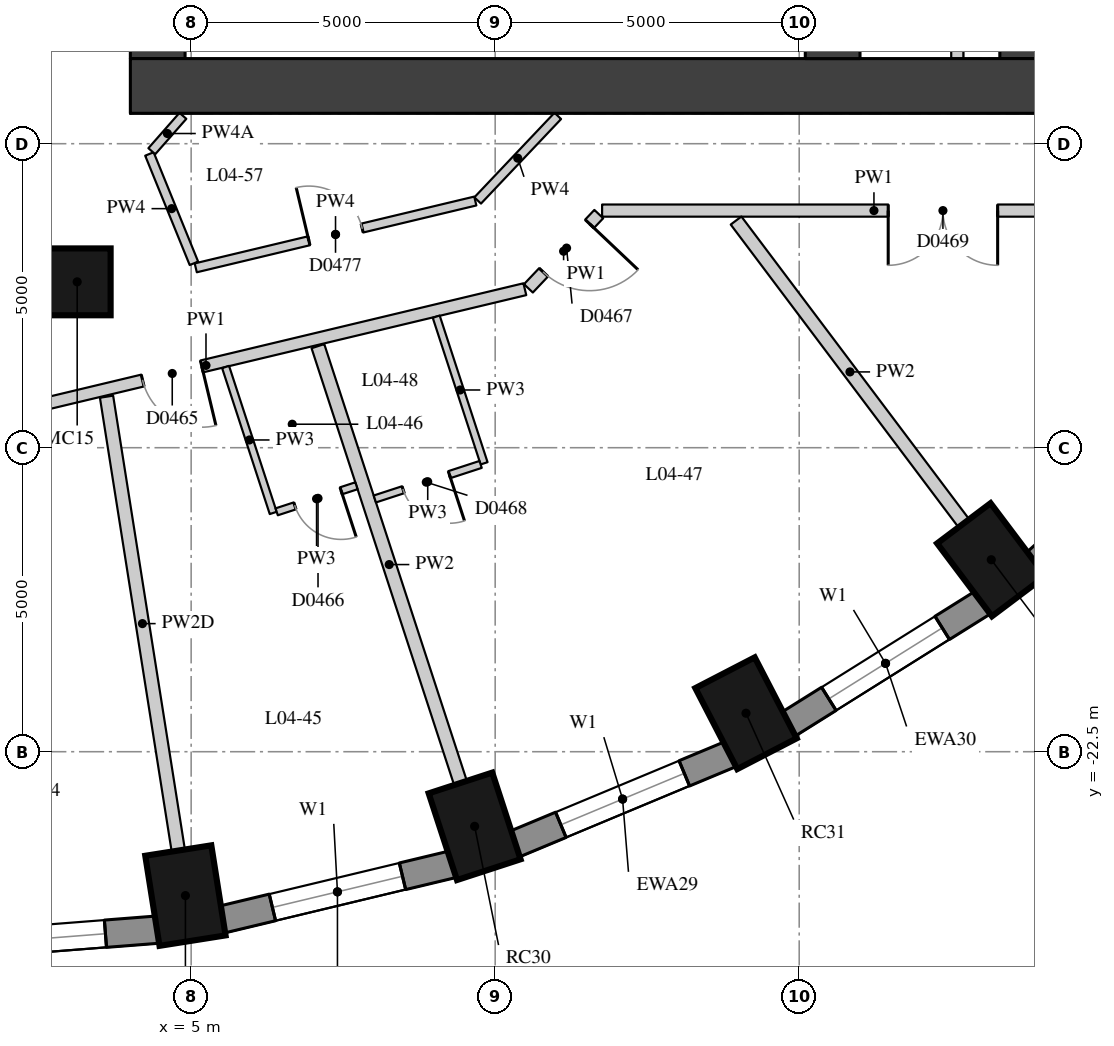
"""IFC4 building model, lengths in metres.
Left out: names, types, materials, properties, quantities, classifications, styles, units other than length and angle.
Written with IfcOpenShell. Run it as: python <this file> out.ifc"""

import sys

from ifc_helpers import new_model, si_unit, direction, frame, frame_2d, origin, origin_2d, place, context, subcontext, project, spatial, rectangle, extrude, element, fill, save


model = new_model("IFC4")
c1 = context("Model", 3, precision=1e-05, world=origin(), true_north=direction((0.0, 1.0)))
c2 = subcontext(c1, "Body", "Model", "MODEL_VIEW")
j1 = project(units=[si_unit("LENGTHUNIT", "METRE"), si_unit("PLANEANGLEUNIT", "RADIAN")], contexts=[c1])
p1 = place(None, origin())
s1 = spatial("IfcSite", under=j1, at=p1, CompositionType="ELEMENT")
p2 = place(p1, origin())
s2 = spatial("IfcBuilding", under=s1, at=p2, CompositionType="ELEMENT")
p3 = place(p2, frame((0.0, 0.0, 21.7)))
s3 = spatial("IfcBuildingStorey", under=s2, at=p3, CompositionType="ELEMENT", Elevation=21.7)
for number, where, z_axis, x_axis in (
    (1, (4.906, -24.866, 0.0), (0.0, 0.0, 1.0), (0.156, -0.988, 0.0)),
    (2, (9.662, -23.727, 0.0), (0.0, 0.0, 1.0), (0.31, -0.951, 0.0)),
    (3, (14.125, -21.867, 0.0), (0.0, 0.0, 1.0), (0.46, -0.888, 0.0)),
    (4, (18.159, -19.343, 0.0), (0.0, 0.0, 1.0), (0.601, -0.799, 0.0)),
):
    element("IfcColumn", number, at=place(p3, frame(where, z_axis=z_axis, x_axis=x_axis)), inside=s3, PredefinedType="COLUMN", context=c2, shape_type="SweptSolid", body=[
        extrude(rectangle(XDim=1.5, YDim=1.1, at=origin_2d()), origin(), (0.0, 0.0, 1.0), 3.3),
    ])
p4 = place(p3, frame((3.126, -14.772, 0.0), z_axis=(0.0, 0.0, 1.0), x_axis=(1.0, 0.0, 0.0)))
e5 = element("IfcColumn", 5, at=p4, inside=s3, PredefinedType="COLUMN", context=c2, shape_type="SweptSolid", body=[
    extrude(rectangle(XDim=1.1, YDim=1.1, at=origin_2d()), origin(), (0.0, 0.0, 1.0), 3.3),
])
p5 = place(p3, frame((0.53, -25.733, 0.0), z_axis=(0.0, 0.0, 1.0), x_axis=(0.996955972145, 0.077966592873, 0.0)))
e6 = element("IfcWall", 6, at=p5, inside=s3, PredefinedType="SOLIDWALL", context=c2, shape_type="SweptSolid", body=[
    extrude(rectangle(XDim=3.939, YDim=0.45, at=frame_2d((1.97, 0.0))), origin(), (0.0, 0.0, 1.0), 3.02),
])
p6 = place(p5, frame((0.87, 0.0, 0.4)))
e7 = element("IfcOpeningElement", 7, at=p6, cuts=e6, PredefinedType="OPENING", context=c2, shape_type="SweptSolid", body=[
    extrude(rectangle(XDim=2.2, YDim=1.75, at=frame_2d((1.1, 0.875))), frame((0.0, 0.235, 0.0), z_axis=(0.0, -1.0, 0.0), x_axis=(1.0, 0.0, 0.0)), (0.0, 0.0, 1.0), 0.47),
])
p7 = place(p3, frame((5.504, -25.26, 0.0), z_axis=(0.0, 0.0, 1.0), x_axis=(0.972496561493, 0.232917233979, 0.0)))
e8 = element("IfcWall", 8, at=p7, inside=s3, PredefinedType="SOLIDWALL", context=c2, shape_type="SweptSolid", body=[
    extrude(rectangle(XDim=3.911, YDim=0.45, at=frame_2d((1.956, 0.0))), origin(), (0.0, 0.0, 1.0), 3.02),
])
p8 = place(p7, frame((0.855, 0.0, 0.4)))
e9 = element("IfcOpeningElement", 9, at=p8, cuts=e8, PredefinedType="OPENING", context=c2, shape_type="SweptSolid", body=[
    extrude(rectangle(XDim=2.2, YDim=1.75, at=frame_2d((1.1, 0.875))), frame((0.0, 0.235, 0.0), z_axis=(0.0, -1.0, 0.0), x_axis=(1.0, 0.0, 0.0)), (0.0, 0.0, 1.0), 0.47),
])
p9 = place(p3, frame((10.315, -24.021, 0.0), z_axis=(0.0, 0.0, 1.0), x_axis=(0.923031964282, 0.384723267966, 0.0)))
e10 = element("IfcWall", 10, at=p9, inside=s3, PredefinedType="SOLIDWALL", context=c2, shape_type="SweptSolid", body=[
    extrude(rectangle(XDim=3.856, YDim=0.45, at=frame_2d((1.928, 0.0))), origin(), (0.0, 0.0, 1.0), 3.02),
])
p10 = place(p9, frame((0.828, 0.0, 0.4)))
e11 = element("IfcOpeningElement", 11, at=p10, cuts=e10, PredefinedType="OPENING", context=c2, shape_type="SweptSolid", body=[
    extrude(rectangle(XDim=2.2, YDim=1.75, at=frame_2d((1.1, 0.875))), frame((0.0, 0.235, 0.0), z_axis=(0.0, -1.0, 0.0), x_axis=(1.0, 0.0, 0.0)), (0.0, 0.0, 1.0), 0.47),
])
p11 = place(p3, frame((14.817, -22.051, 0.0), z_axis=(0.0, 0.0, 1.0), x_axis=(0.847635480093, 0.530579016629, 0.0)))
e12 = element("IfcWall", 12, at=p11, inside=s3, PredefinedType="SOLIDWALL", context=c2, shape_type="SweptSolid", body=[
    extrude(rectangle(XDim=3.782, YDim=0.45, at=frame_2d((1.891, 0.0))), origin(), (0.0, 0.0, 1.0), 3.02),
])
p12 = place(p11, frame((0.791, 0.0, 0.4)))
e13 = element("IfcOpeningElement", 13, at=p12, cuts=e12, PredefinedType="OPENING", context=c2, shape_type="SweptSolid", body=[
    extrude(rectangle(XDim=2.2, YDim=1.75, at=frame_2d((1.1, 0.875))), frame((0.0, 0.235, 0.0), z_axis=(0.0, -1.0, 0.0), x_axis=(1.0, 0.0, 0.0)), (0.0, 0.0, 1.0), 0.47),
])
p13 = place(p3, frame((18.871, -19.407, 0.0), z_axis=(0.0, 0.0, 1.0), x_axis=(0.745526233716, 0.66647628228, 0.0)))
e14 = element("IfcWall", 14, at=p13, inside=s3, PredefinedType="SOLIDWALL", context=c2, shape_type="SweptSolid", body=[
    extrude(rectangle(XDim=3.697, YDim=0.45, at=frame_2d((1.848, 0.0))), origin(), (0.0, 0.0, 1.0), 3.02),
])
p14 = place(p3, frame((4.45, -11.1, 0.0), z_axis=(0.0, 0.0, 1.0), x_axis=(0.0, 1.0, 0.0)))
e15 = element("IfcWall", 15, at=p14, inside=s3, PredefinedType="SHEAR", context=c2, shape_type="SweptSolid", body=[
    extrude(rectangle(XDim=22.2, YDim=0.9, at=frame_2d((11.1, 0.0))), origin(), (0.0, 0.0, 1.0), 3.02),
])
p15 = place(p14, frame((2.35, 0.0, 0.0)))
e16 = element("IfcOpeningElement", 16, at=p15, cuts=e15, PredefinedType="OPENING", context=c2, shape_type="SweptSolid", body=[
    extrude(rectangle(XDim=1.5, YDim=2.1, at=frame_2d((0.75, 1.05))), frame((0.0, 0.46, 0.0), z_axis=(0.0, -1.0, 0.0), x_axis=(1.0, 0.0, 0.0)), (0.0, 0.0, 1.0), 0.92),
])
p16 = place(p14, frame((5.45, 0.0, 0.0)))
e17 = element("IfcOpeningElement", 17, at=p16, cuts=e15, PredefinedType="OPENING", context=c2, shape_type="SweptSolid", body=[
    extrude(rectangle(XDim=1.8, YDim=2.1, at=frame_2d((0.9, 1.05))), frame((0.0, 0.46, 0.0), z_axis=(0.0, -1.0, 0.0), x_axis=(1.0, 0.0, 0.0)), (0.0, 0.0, 1.0), 0.92),
])
p17 = place(p14, frame((7.95, 0.0, 0.0)))
e18 = element("IfcOpeningElement", 18, at=p17, cuts=e15, PredefinedType="OPENING", context=c2, shape_type="SweptSolid", body=[
    extrude(rectangle(XDim=1.1, YDim=2.1, at=frame_2d((0.55, 1.05))), frame((0.0, 0.46, 0.0), z_axis=(0.0, -1.0, 0.0), x_axis=(1.0, 0.0, 0.0)), (0.0, 0.0, 1.0), 0.92),
])
p18 = place(p14, frame((10.6, 0.0, 0.0)))
e19 = element("IfcOpeningElement", 19, at=p18, cuts=e15, PredefinedType="OPENING", context=c2, shape_type="SweptSolid", body=[
    extrude(rectangle(XDim=1.0, YDim=2.1, at=frame_2d((0.5, 1.05))), frame((0.0, 0.46, 0.0), z_axis=(0.0, -1.0, 0.0), x_axis=(1.0, 0.0, 0.0)), (0.0, 0.0, 1.0), 0.92),
])
p19 = place(p14, frame((13.15, 0.0, 0.0)))
e20 = element("IfcOpeningElement", 20, at=p19, cuts=e15, PredefinedType="OPENING", context=c2, shape_type="SweptSolid", body=[
    extrude(rectangle(XDim=1.1, YDim=2.1, at=frame_2d((0.55, 1.05))), frame((0.0, 0.46, 0.0), z_axis=(0.0, -1.0, 0.0), x_axis=(1.0, 0.0, 0.0)), (0.0, 0.0, 1.0), 0.92),
])
p20 = place(p14, frame((14.95, 0.0, 0.0)))
e21 = element("IfcOpeningElement", 21, at=p20, cuts=e15, PredefinedType="OPENING", context=c2, shape_type="SweptSolid", body=[
    extrude(rectangle(XDim=1.8, YDim=2.1, at=frame_2d((0.9, 1.05))), frame((0.0, 0.46, 0.0), z_axis=(0.0, -1.0, 0.0), x_axis=(1.0, 0.0, 0.0)), (0.0, 0.0, 1.0), 0.92),
])
p21 = place(p14, frame((18.35, 0.0, 0.0)))
e22 = element("IfcOpeningElement", 22, at=p21, cuts=e15, PredefinedType="OPENING", context=c2, shape_type="SweptSolid", body=[
    extrude(rectangle(XDim=1.5, YDim=2.1, at=frame_2d((0.75, 1.05))), frame((0.0, 0.46, 0.0), z_axis=(0.0, -1.0, 0.0), x_axis=(1.0, 0.0, 0.0)), (0.0, 0.0, 1.0), 0.92),
])
p22 = place(p3, frame((18.75, -11.1, 0.0), z_axis=(0.0, 0.0, 1.0), x_axis=(0.0, 1.0, 0.0)))
e23 = element("IfcWall", 23, at=p22, inside=s3, PredefinedType="SHEAR", context=c2, shape_type="SweptSolid", body=[
    extrude(rectangle(XDim=22.2, YDim=0.9, at=frame_2d((11.1, 0.0))), origin(), (0.0, 0.0, 1.0), 3.02),
])
p23 = place(p22, frame((15.925, 0.0, 0.0)))
e24 = element("IfcOpeningElement", 24, at=p23, cuts=e23, PredefinedType="OPENING", context=c2, shape_type="SweptSolid", body=[
    extrude(rectangle(XDim=1.5, YDim=2.1, at=frame_2d((0.75, 1.05))), frame((0.0, 0.46, 0.0), z_axis=(0.0, -1.0, 0.0), x_axis=(1.0, 0.0, 0.0)), (0.0, 0.0, 1.0), 0.92),
])
p24 = place(p22, frame((4.525, 0.0, 0.0)))
e25 = element("IfcOpeningElement", 25, at=p24, cuts=e23, PredefinedType="OPENING", context=c2, shape_type="SweptSolid", body=[
    extrude(rectangle(XDim=1.5, YDim=2.1, at=frame_2d((0.75, 1.05))), frame((0.0, 0.46, 0.0), z_axis=(0.0, -1.0, 0.0), x_axis=(1.0, 0.0, 0.0)), (0.0, 0.0, 1.0), 0.92),
])
p25 = place(p3, frame((4.0, -11.55, 0.0), z_axis=(0.0, 0.0, 1.0), x_axis=(1.0, 0.0, 0.0)))
e26 = element("IfcWall", 26, at=p25, inside=s3, PredefinedType="SHEAR", context=c2, shape_type="SweptSolid", body=[
    extrude(rectangle(XDim=15.2, YDim=0.9, at=frame_2d((7.6, 0.0))), origin(), (0.0, 0.0, 1.0), 3.02),
])
p26 = place(p3, frame((15.55, -11.1, 0.0), z_axis=(0.0, 0.0, 1.0), x_axis=(0.0, 1.0, 0.0)))
e27 = element("IfcWall", 27, at=p26, inside=s3, PredefinedType="SHEAR", context=c2, shape_type="SweptSolid", body=[
    extrude(rectangle(XDim=22.2, YDim=0.9, at=frame_2d((11.1, 0.0))), origin(), (0.0, 0.0, 1.0), 3.02),
])
p27 = place(p26, frame((15.6, 0.0, 0.0)))
e28 = element("IfcOpeningElement", 28, at=p27, cuts=e27, PredefinedType="OPENING", context=c2, shape_type="SweptSolid", body=[
    extrude(rectangle(XDim=1.0, YDim=2.1, at=frame_2d((0.5, 1.05))), frame((0.0, 0.46, 0.0), z_axis=(0.0, -1.0, 0.0), x_axis=(1.0, 0.0, 0.0)), (0.0, 0.0, 1.0), 0.92),
])
p28 = place(p26, frame((5.6, 0.0, 0.0)))
e29 = element("IfcOpeningElement", 29, at=p28, cuts=e27, PredefinedType="OPENING", context=c2, shape_type="SweptSolid", body=[
    extrude(rectangle(XDim=1.0, YDim=2.1, at=frame_2d((0.5, 1.05))), frame((0.0, 0.46, 0.0), z_axis=(0.0, -1.0, 0.0), x_axis=(1.0, 0.0, 0.0)), (0.0, 0.0, 1.0), 0.92),
])
p29 = place(p3, frame((17.6, -11.1, 0.0), z_axis=(0.0, 0.0, 1.0), x_axis=(0.0, 1.0, 0.0)))
e30 = element("IfcWall", 30, at=p29, inside=s3, PredefinedType="PARTITIONING", context=c2, shape_type="SweptSolid", body=[
    extrude(rectangle(XDim=3.7, YDim=0.2, at=frame_2d((1.85, 0.0))), origin(), (0.0, 0.0, 1.0), 3.02),
])
p30 = place(p3, frame((20.7, -13.6, 0.0), z_axis=(0.0, 0.0, 1.0), x_axis=(-1.0, 0.0, 0.0)))
e31 = element("IfcWall", 31, at=p30, inside=s3, PredefinedType="PARTITIONING", context=c2, shape_type="SweptSolid", body=[
    extrude(rectangle(XDim=8.941, YDim=0.2, at=frame_2d((4.471, 0.0))), origin(), (0.0, 0.0, 1.0), 3.02),
])
p31 = place(p30, frame((2.436, 0.0, 0.0)))
e32 = element("IfcOpeningElement", 32, at=p31, cuts=e31, PredefinedType="OPENING", context=c2, shape_type="SweptSolid", body=[
    extrude(rectangle(XDim=1.8, YDim=2.1, at=frame_2d((0.9, 1.05))), frame((0.0, 0.11, 0.0), z_axis=(0.0, -1.0, 0.0), x_axis=(1.0, 0.0, 0.0)), (0.0, 0.0, 1.0), 0.22),
])
p32 = place(p3, frame((11.704, -13.658, 0.0), z_axis=(0.0, 0.0, 1.0), x_axis=(-0.687768795377, -0.725929806597, 0.0)))
e33 = element("IfcWall", 33, at=p32, inside=s3, PredefinedType="PARTITIONING", context=c2, shape_type="SweptSolid", body=[
    extrude(rectangle(XDim=1.683, YDim=0.2, at=frame_2d((0.841, 0.0))), origin(), (0.0, 0.0, 1.0), 3.02),
])
p33 = place(p32, frame((0.22, 0.0, 0.0)))
e34 = element("IfcOpeningElement", 34, at=p33, cuts=e33, PredefinedType="OPENING", context=c2, shape_type="SweptSolid", body=[
    extrude(rectangle(XDim=1.1, YDim=2.1, at=frame_2d((0.55, 1.05))), frame((0.0, 0.11, 0.0), z_axis=(0.0, -1.0, 0.0), x_axis=(1.0, 0.0, 0.0)), (0.0, 0.0, 1.0), 0.22),
])
p34 = place(p3, frame((10.488, -14.893, 0.0), z_axis=(0.0, 0.0, 1.0), x_axis=(-0.972603489924, -0.23247032367, 0.0)))
e35 = element("IfcWall", 35, at=p34, inside=s3, PredefinedType="PARTITIONING", context=c2, shape_type="SweptSolid", body=[
    extrude(rectangle(XDim=10.783, YDim=0.2, at=frame_2d((5.392, 0.0))), origin(), (0.0, 0.0, 1.0), 3.02),
])
p35 = place(p34, frame((8.59, 0.0, 0.0)))
e36 = element("IfcOpeningElement", 36, at=p35, cuts=e35, PredefinedType="OPENING", context=c2, shape_type="SweptSolid", body=[
    extrude(rectangle(XDim=0.9, YDim=2.1, at=frame_2d((0.45, 1.05))), frame((0.0, 0.11, 0.0), z_axis=(0.0, -1.0, 0.0), x_axis=(1.0, 0.0, 0.0)), (0.0, 0.0, 1.0), 0.22),
])
p36 = place(p34, frame((5.462, 0.0, 0.0)))
e37 = element("IfcOpeningElement", 37, at=p36, cuts=e35, PredefinedType="OPENING", context=c2, shape_type="SweptSolid", body=[
    extrude(rectangle(XDim=1.0, YDim=2.1, at=frame_2d((0.5, 1.05))), frame((0.0, 0.11, 0.0), z_axis=(0.0, -1.0, 0.0), x_axis=(1.0, 0.0, 0.0)), (0.0, 0.0, 1.0), 0.22),
])
p37 = place(p3, frame((11.03, -12.043, 0.0), z_axis=(0.0, 0.0, 1.0), x_axis=(-0.687734044261, -0.725962729322, 0.0)))
e38 = element("IfcWall", 38, at=p37, inside=s3, PredefinedType="PARTITIONING", context=c2, shape_type="SweptSolid", body=[
    extrude(rectangle(XDim=1.916, YDim=0.15, at=frame_2d((0.958, 0.0))), origin(), (0.0, 0.0, 1.0), 3.02),
])
p38 = place(p3, frame((9.673, -13.443, 0.0), z_axis=(0.0, 0.0, 1.0), x_axis=(-0.972603013932, -0.232472315103, 0.0)))
e39 = element("IfcWall", 39, at=p38, inside=s3, PredefinedType="PARTITIONING", context=c2, shape_type="SweptSolid", body=[
    extrude(rectangle(XDim=4.727, YDim=0.15, at=frame_2d((2.363, 0.0))), origin(), (0.0, 0.0, 1.0), 3.02),
])
p39 = place(p38, frame((1.914, 0.0, 0.0)))
e40 = element("IfcOpeningElement", 40, at=p39, cuts=e39, PredefinedType="OPENING", context=c2, shape_type="SweptSolid", body=[
    extrude(rectangle(XDim=0.9, YDim=2.1, at=frame_2d((0.45, 1.05))), frame((0.0, 0.085, 0.0), z_axis=(0.0, -1.0, 0.0), x_axis=(1.0, 0.0, 0.0)), (0.0, 0.0, 1.0), 0.17),
])
p40 = place(p3, frame((5.045, -14.468, 0.0), z_axis=(0.0, 0.0, 1.0), x_axis=(-0.376889538578, 0.926258212223, 0.0)))
e41 = element("IfcWall", 41, at=p40, inside=s3, PredefinedType="PARTITIONING", context=c2, shape_type="SweptSolid", body=[
    extrude(rectangle(XDim=1.942, YDim=0.15, at=frame_2d((0.971, 0.0))), origin(), (0.0, 0.0, 1.0), 3.02),
])
p41 = place(p3, frame((4.353, -12.623, 0.0), z_axis=(0.0, 0.0, 1.0), x_axis=(0.660265480509, 0.751032286422, 0.0)))
e42 = element("IfcWall", 42, at=p41, inside=s3, PredefinedType="PARTITIONING", context=c2, shape_type="SweptSolid", body=[
    extrude(rectangle(XDim=0.775, YDim=0.15, at=frame_2d((0.387, 0.0))), origin(), (0.0, 0.0, 1.0), 2.57),
])
p42 = place(p3, frame((4.788, -24.125, 0.0), z_axis=(0.0, 0.0, 1.0), x_axis=(-0.156131781396, 0.987736233434, 0.0)))
e43 = element("IfcWall", 43, at=p42, inside=s3, PredefinedType="PARTITIONING", context=c2, shape_type="SweptSolid", body=[
    extrude(rectangle(XDim=7.557, YDim=0.22, at=frame_2d((3.779, 0.0))), origin(), (0.0, 0.0, 1.0), 2.47),
])
p43 = place(p3, frame((9.429, -23.014, 0.0), z_axis=(0.0, 0.0, 1.0), x_axis=(-0.310261176215, 0.950651356983, 0.0)))
e44 = element("IfcWall", 44, at=p43, inside=s3, PredefinedType="PARTITIONING", context=c2, shape_type="SweptSolid", body=[
    extrude(rectangle(XDim=7.557, YDim=0.22, at=frame_2d((3.779, 0.0))), origin(), (0.0, 0.0, 1.0), 3.02),
])
p44 = place(p3, frame((17.708, -18.743, 0.0), z_axis=(0.0, 0.0, 1.0), x_axis=(-0.601177883261, 0.799115231164, 0.0)))
e45 = element("IfcWall", 45, at=p44, inside=s3, PredefinedType="PARTITIONING", context=c2, shape_type="SweptSolid", body=[
    extrude(rectangle(XDim=6.231, YDim=0.22, at=frame_2d((3.116, 0.0))), origin(), (0.0, 0.0, 1.0), 3.02),
])
p45 = place(p3, frame((5.566, -16.172, 0.0), z_axis=(0.0, 0.0, 1.0), x_axis=(0.310159281599, -0.950684605975, 0.0)))
e46 = element("IfcWall", 46, at=p45, inside=s3, PredefinedType="PARTITIONING", context=c2, shape_type="SweptSolid", body=[
    extrude(rectangle(XDim=2.525, YDim=0.12, at=frame_2d((1.263, 0.0))), origin(), (0.0, 0.0, 1.0), 3.02),
])
p46 = place(p3, frame((9.03, -15.344, 0.0), z_axis=(0.0, 0.0, 1.0), x_axis=(0.310275804943, -0.950646582525, 0.0)))
e47 = element("IfcWall", 47, at=p46, inside=s3, PredefinedType="PARTITIONING", context=c2, shape_type="SweptSolid", body=[
    extrude(rectangle(XDim=2.538, YDim=0.12, at=frame_2d((1.269, 0.0))), origin(), (0.0, 0.0, 1.0), 3.02),
])
p47 = place(p3, frame((6.407, -18.554, 0.0), z_axis=(0.0, 0.0, 1.0), x_axis=(0.950628893115, 0.310329997864, 0.0)))
e48 = element("IfcWall", 48, at=p47, inside=s3, PredefinedType="PARTITIONING", context=c2, shape_type="SweptSolid", body=[
    extrude(rectangle(XDim=1.38, YDim=0.12, at=frame_2d((0.69, 0.0))), origin(), (0.0, 0.0, 1.0), 3.02),
])
p48 = place(p47, frame((0.315, 0.0, 0.0)))
e49 = element("IfcOpeningElement", 49, at=p48, cuts=e48, PredefinedType="OPENING", context=c2, shape_type="SweptSolid", body=[
    extrude(rectangle(XDim=0.8, YDim=2.1, at=frame_2d((0.4, 1.05))), frame((0.0, 0.07, 0.0), z_axis=(0.0, -1.0, 0.0), x_axis=(1.0, 0.0, 0.0)), (0.0, 0.0, 1.0), 0.14),
])
p49 = place(p3, frame((9.76, -17.775, 0.0), z_axis=(0.0, 0.0, 1.0), x_axis=(-0.950599833202, -0.310419002506, 0.0)))
e50 = element("IfcWall", 50, at=p49, inside=s3, PredefinedType="PARTITIONING", context=c2, shape_type="SweptSolid", body=[
    extrude(rectangle(XDim=1.83, YDim=0.12, at=frame_2d((0.915, 0.0))), origin(), (0.0, 0.0, 1.0), 3.02),
])
p50 = place(p49, frame((0.54, 0.0, 0.0)))
e51 = element("IfcOpeningElement", 51, at=p50, cuts=e50, PredefinedType="OPENING", context=c2, shape_type="SweptSolid", body=[
    extrude(rectangle(XDim=0.8, YDim=2.1, at=frame_2d((0.4, 1.05))), frame((0.0, 0.07, 0.0), z_axis=(0.0, -1.0, 0.0), x_axis=(1.0, 0.0, 0.0)), (0.0, 0.0, 1.0), 0.14),
])
p51 = place(p6, origin())
e52 = element("IfcWindow", 52, at=p51, inside=s3, PartitioningType="SINGLE_PANEL", PredefinedType="WINDOW", context=c2, shape_type="SweptSolid", body=[
    extrude(rectangle(XDim=2.2, YDim=1.75, at=frame_2d((1.1, 0.875))), frame((0.0, 0.035, 0.0), z_axis=(0.0, -1.0, 0.0), x_axis=(1.0, 0.0, 0.0)), (0.0, 0.0, 1.0), 0.06),
])
fill(e7, e52)
p52 = place(p8, origin())
e53 = element("IfcWindow", 53, at=p52, inside=s3, PartitioningType="SINGLE_PANEL", PredefinedType="WINDOW", context=c2, shape_type="SweptSolid", body=[
    extrude(rectangle(XDim=2.2, YDim=1.75, at=frame_2d((1.1, 0.875))), frame((0.0, 0.035, 0.0), z_axis=(0.0, -1.0, 0.0), x_axis=(1.0, 0.0, 0.0)), (0.0, 0.0, 1.0), 0.06),
])
fill(e9, e53)
p53 = place(p10, origin())
e54 = element("IfcWindow", 54, at=p53, inside=s3, PartitioningType="SINGLE_PANEL", PredefinedType="WINDOW", context=c2, shape_type="SweptSolid", body=[
    extrude(rectangle(XDim=2.2, YDim=1.75, at=frame_2d((1.1, 0.875))), frame((0.0, 0.035, 0.0), z_axis=(0.0, -1.0, 0.0), x_axis=(1.0, 0.0, 0.0)), (0.0, 0.0, 1.0), 0.06),
])
fill(e11, e54)
p54 = place(p12, origin())
e55 = element("IfcWindow", 55, at=p54, inside=s3, PartitioningType="SINGLE_PANEL", PredefinedType="WINDOW", context=c2, shape_type="SweptSolid", body=[
    extrude(rectangle(XDim=2.2, YDim=1.75, at=frame_2d((1.1, 0.875))), frame((0.0, 0.035, 0.0), z_axis=(0.0, -1.0, 0.0), x_axis=(1.0, 0.0, 0.0)), (0.0, 0.0, 1.0), 0.06),
])
fill(e13, e55)
p55 = place(p36, origin())
e56 = element("IfcDoor", 56, at=p55, inside=s3, OperationType="SINGLE_SWING_LEFT", PredefinedType="DOOR", context=c2, shape_type="SweptSolid", body=[
    extrude(rectangle(XDim=1.0, YDim=2.1, at=frame_2d((0.5, 1.05))), frame((0.0, 0.025, 0.0), z_axis=(0.0, -1.0, 0.0), x_axis=(1.0, 0.0, 0.0)), (0.0, 0.0, 1.0), 0.05),
])
fill(e37, e56)
p56 = place(p48, origin())
e57 = element("IfcDoor", 57, at=p56, inside=s3, OperationType="SINGLE_SWING_LEFT", PredefinedType="DOOR", context=c2, shape_type="SweptSolid", body=[
    extrude(rectangle(XDim=0.8, YDim=2.1, at=frame_2d((0.4, 1.05))), frame((0.0, 0.025, 0.0), z_axis=(0.0, -1.0, 0.0), x_axis=(1.0, 0.0, 0.0)), (0.0, 0.0, 1.0), 0.05),
])
fill(e49, e57)
p57 = place(p33, origin())
e58 = element("IfcDoor", 58, at=p57, inside=s3, OperationType="SINGLE_SWING_LEFT", PredefinedType="DOOR", context=c2, shape_type="SweptSolid", body=[
    extrude(rectangle(XDim=1.1, YDim=2.1, at=frame_2d((0.55, 1.05))), frame((0.0, 0.025, 0.0), z_axis=(0.0, -1.0, 0.0), x_axis=(1.0, 0.0, 0.0)), (0.0, 0.0, 1.0), 0.05),
])
fill(e34, e58)
p58 = place(p50, origin())
e59 = element("IfcDoor", 59, at=p58, inside=s3, OperationType="SINGLE_SWING_LEFT", PredefinedType="DOOR", context=c2, shape_type="SweptSolid", body=[
    extrude(rectangle(XDim=0.8, YDim=2.1, at=frame_2d((0.4, 1.05))), frame((0.0, 0.025, 0.0), z_axis=(0.0, -1.0, 0.0), x_axis=(1.0, 0.0, 0.0)), (0.0, 0.0, 1.0), 0.05),
])
fill(e51, e59)
p59 = place(p31, origin())
e60 = element("IfcDoor", 60, at=p59, inside=s3, OperationType="DOUBLE_DOOR_SINGLE_SWING", PredefinedType="DOOR", context=c2, shape_type="SweptSolid", body=[
    extrude(rectangle(XDim=1.8, YDim=2.1, at=frame_2d((0.9, 1.05))), frame((0.0, 0.025, 0.0), z_axis=(0.0, -1.0, 0.0), x_axis=(1.0, 0.0, 0.0)), (0.0, 0.0, 1.0), 0.05),
])
fill(e32, e60)
p60 = place(p39, origin())
e61 = element("IfcDoor", 61, at=p60, inside=s3, OperationType="SINGLE_SWING_LEFT", PredefinedType="DOOR", context=c2, shape_type="SweptSolid", body=[
    extrude(rectangle(XDim=0.9, YDim=2.1, at=frame_2d((0.45, 1.05))), frame((0.0, 0.025, 0.0), z_axis=(0.0, -1.0, 0.0), x_axis=(1.0, 0.0, 0.0)), (0.0, 0.0, 1.0), 0.05),
])
fill(e40, e61)
save(model, sys.argv[1])
